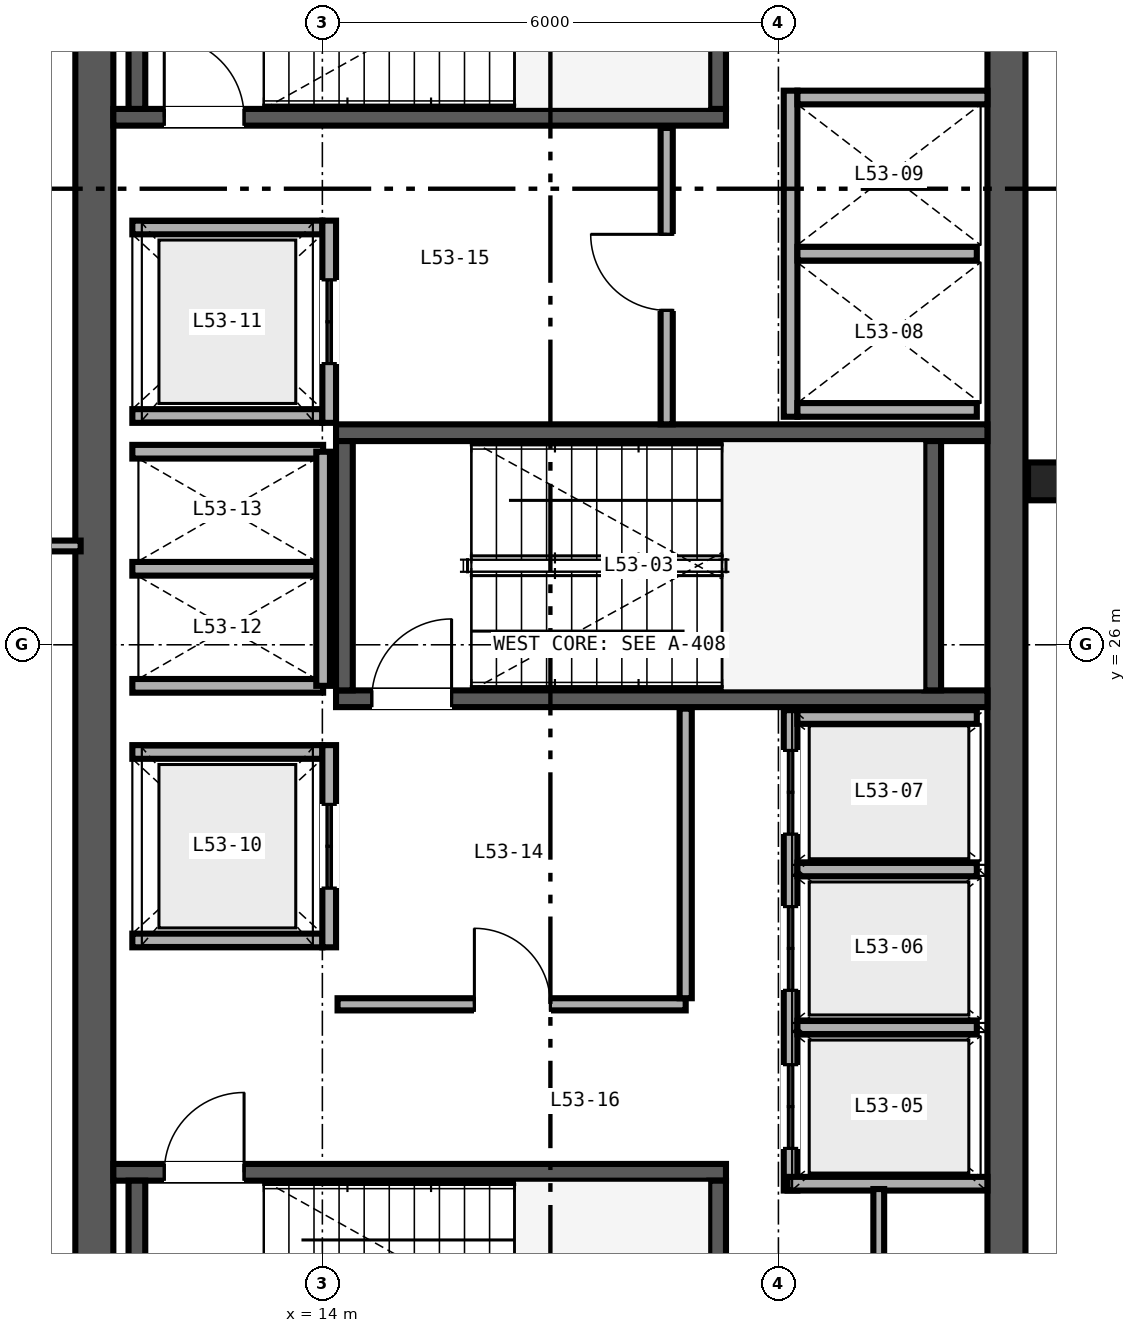
"""IFC4 building model, lengths in metres.
Left out: names, types, materials, properties, quantities, classifications, styles, units other than length and angle.
Written with IfcOpenShell. Run it as: python <this file> out.ifc"""

import sys

from ifc_helpers import new_model, si_unit, direction, frame, frame_2d, origin, origin_2d, place, context, subcontext, project, spatial, rectangle, i_section, extrude, source, transform, mapped, element, fill, save


model = new_model("IFC4")
c1 = context("Model", 3, precision=1e-05, world=origin(), true_north=direction((0.0, 1.0)))
c2 = subcontext(c1, "Body", "Model", "MODEL_VIEW")
j1 = project(units=[si_unit("LENGTHUNIT", "METRE"), si_unit("PLANEANGLEUNIT", "RADIAN")], contexts=[c1])
p1 = place(None, origin())
s1 = spatial("IfcSite", under=j1, at=p1, CompositionType="ELEMENT")
p2 = place(p1, origin())
s2 = spatial("IfcBuilding", under=s1, at=p2, CompositionType="ELEMENT")
p3 = place(p2, frame((0.0, 0.0, 210.0)))
s3 = spatial("IfcBuildingStorey", under=s2, at=p3, CompositionType="ELEMENT", Elevation=210.0)
for number, where, z_axis, x_axis in (
    (1, (11.0, 15.25, 0.0), (0.0, 0.0, 1.0), (0.0, 1.0, 0.0)),
    (2, (23.0, 15.25, 0.0), (0.0, 0.0, 1.0), (0.0, 1.0, 0.0)),
):
    element("IfcWall", number, at=place(p3, frame(where, z_axis=z_axis, x_axis=x_axis)), inside=s3, PredefinedType="SHEAR", context=c2, shape_type="SweptSolid", body=[
        extrude(rectangle(XDim=21.5, YDim=0.5, at=frame_2d((10.75, 0.0))), origin(), (0.0, 0.0, 1.0), 3.37),
    ])
p4 = place(p3, frame((11.25, 19.06, 0.0), z_axis=(0.0, 0.0, 1.0), x_axis=(1.0, 0.0, 0.0)))
e3 = element("IfcWall", 3, at=p4, inside=s3, PredefinedType="SHEAR", context=c2, shape_type="SweptSolid", body=[
    extrude(rectangle(XDim=8.06, YDim=0.22, at=frame_2d((4.03, 0.0))), origin(), (0.0, 0.0, 1.0), 3.4),
])
p5 = place(p4, frame((0.67, 0.0, 0.0)))
e4 = element("IfcOpeningElement", 4, at=p5, cuts=e3, PredefinedType="OPENING", context=c2, shape_type="SweptSolid", body=[
    extrude(rectangle(XDim=1.05, YDim=2.15, at=frame_2d((0.525, 1.075))), frame((0.0, 0.12, 0.0), z_axis=(0.0, -1.0, 0.0), x_axis=(1.0, 0.0, 0.0)), (0.0, 0.0, 1.0), 0.24),
])
for number, where, z_axis, x_axis in (
    (5, (11.56, 15.67, 0.0), (0.0, 0.0, 1.0), (0.0, 1.0, 0.0)),
    (6, (19.2, 15.67, 0.0), (0.0, 0.0, 1.0), (0.0, 1.0, 0.0)),
):
    element("IfcWall", number, at=place(p3, frame(where, z_axis=z_axis, x_axis=x_axis)), inside=s3, PredefinedType="SHEAR", context=c2, shape_type="SweptSolid", body=[
        extrude(rectangle(XDim=3.28, YDim=0.22, at=frame_2d((1.64, 0.0))), origin(), (0.0, 0.0, 1.0), 3.4),
    ])
p6 = place(p3, frame((11.25, 32.94, 0.0), z_axis=(0.0, 0.0, 1.0), x_axis=(1.0, 0.0, 0.0)))
e7 = element("IfcWall", 7, at=p6, inside=s3, PredefinedType="SHEAR", context=c2, shape_type="SweptSolid", body=[
    extrude(rectangle(XDim=8.06, YDim=0.22, at=frame_2d((4.03, 0.0))), origin(), (0.0, 0.0, 1.0), 3.4),
])
p7 = place(p6, frame((0.67, 0.0, 0.0)))
e8 = element("IfcOpeningElement", 8, at=p7, cuts=e7, PredefinedType="OPENING", context=c2, shape_type="SweptSolid", body=[
    extrude(rectangle(XDim=1.05, YDim=2.15, at=frame_2d((0.525, 1.075))), frame((0.0, 0.12, 0.0), z_axis=(0.0, -1.0, 0.0), x_axis=(1.0, 0.0, 0.0)), (0.0, 0.0, 1.0), 0.24),
])
for number, where, z_axis, x_axis in (
    (9, (11.56, 33.05, 0.0), (0.0, 0.0, 1.0), (0.0, 1.0, 0.0)),
    (10, (19.2, 33.05, 0.0), (0.0, 0.0, 1.0), (0.0, 1.0, 0.0)),
):
    element("IfcWall", number, at=place(p3, frame(where, z_axis=z_axis, x_axis=x_axis)), inside=s3, PredefinedType="SHEAR", context=c2, shape_type="SweptSolid", body=[
        extrude(rectangle(XDim=3.28, YDim=0.22, at=frame_2d((1.64, 0.0))), origin(), (0.0, 0.0, 1.0), 3.4),
    ])
p8 = place(p3, frame((14.18, 25.29, 0.0), z_axis=(0.0, 0.0, 1.0), x_axis=(1.0, 0.0, 0.0)))
e11 = element("IfcWall", 11, at=p8, inside=s3, PredefinedType="SHEAR", context=c2, shape_type="SweptSolid", body=[
    extrude(rectangle(XDim=8.57, YDim=0.22, at=frame_2d((4.285, 0.0))), origin(), (0.0, 0.0, 1.0), 3.4),
])
p9 = place(p8, frame((0.47, 0.0, 0.0)))
e12 = element("IfcOpeningElement", 12, at=p9, cuts=e11, PredefinedType="OPENING", context=c2, shape_type="SweptSolid", body=[
    extrude(rectangle(XDim=1.05, YDim=2.15, at=frame_2d((0.525, 1.075))), frame((0.0, 0.12, 0.0), z_axis=(0.0, -1.0, 0.0), x_axis=(1.0, 0.0, 0.0)), (0.0, 0.0, 1.0), 0.24),
])
p10 = place(p3, frame((14.18, 28.79, 0.0), z_axis=(0.0, 0.0, 1.0), x_axis=(1.0, 0.0, 0.0)))
e13 = element("IfcWall", 13, at=p10, inside=s3, PredefinedType="SHEAR", context=c2, shape_type="SweptSolid", body=[
    extrude(rectangle(XDim=8.57, YDim=0.22, at=frame_2d((4.285, 0.0))), origin(), (0.0, 0.0, 1.0), 3.4),
])
for number, where, z_axis, x_axis in (
    (14, (14.29, 25.4, 0.0), (0.0, 0.0, 1.0), (0.0, 1.0, 0.0)),
    (15, (22.03, 25.4, 0.0), (0.0, 0.0, 1.0), (0.0, 1.0, 0.0)),
):
    element("IfcWall", number, at=place(p3, frame(where, z_axis=z_axis, x_axis=x_axis)), inside=s3, PredefinedType="SHEAR", context=c2, shape_type="SweptSolid", body=[
        extrude(rectangle(XDim=3.28, YDim=0.22, at=frame_2d((1.64, 0.0))), origin(), (0.0, 0.0, 1.0), 3.4),
    ])
m1 = source(origin(), c2, "Body", "SweptSolid", [
    extrude(i_section(OverallWidth=0.432, OverallDepth=0.498, WebThickness=0.056, FlangeThickness=0.089, FilletRadius=0.025, at=origin_2d()), origin(), (0.0, 0.0, 1.0), 3.37),
])
p11 = place(p3, frame((23.5, 28.15, 0.0), z_axis=(0.0, 0.0, 1.0), x_axis=(1.0, 0.0, 0.0)))
e16 = element("IfcColumn", 16, at=p11, inside=s3, PredefinedType="COLUMN", context=c2, shape_type="MappedRepresentation", body=[
    mapped(m1, transform((0.0, 0.0, 0.0), scale=1.0)),
])
p12 = place(p3, frame((20.16, 18.82, 0.0), z_axis=(0.0, 0.0, 1.0), x_axis=(0.0, 1.0, 0.0)))
e17 = element("IfcWall", 17, at=p12, inside=s3, PredefinedType="SOLIDWALL", context=c2, shape_type="SweptSolid", body=[
    extrude(rectangle(XDim=6.32, YDim=0.18, at=frame_2d((3.16, 0.0))), origin(), (0.0, 0.0, 1.0), 2.47),
])
p13 = place(p12, frame((0.555, 0.0, 0.0)))
e18 = element("IfcOpeningElement", 18, at=p13, cuts=e17, PredefinedType="OPENING", context=c2, shape_type="SweptSolid", body=[
    extrude(rectangle(XDim=1.1, YDim=2.2, at=frame_2d((0.55, 1.1))), frame((0.0, 0.1, 0.0), z_axis=(0.0, -1.0, 0.0), x_axis=(1.0, 0.0, 0.0)), (0.0, 0.0, 1.0), 0.2),
])
p14 = place(p12, frame((2.635, 0.0, 0.0)))
e19 = element("IfcOpeningElement", 19, at=p14, cuts=e17, PredefinedType="OPENING", context=c2, shape_type="SweptSolid", body=[
    extrude(rectangle(XDim=1.1, YDim=2.2, at=frame_2d((0.55, 1.1))), frame((0.0, 0.1, 0.0), z_axis=(0.0, -1.0, 0.0), x_axis=(1.0, 0.0, 0.0)), (0.0, 0.0, 1.0), 0.2),
])
p15 = place(p12, frame((4.69, 0.0, 0.0)))
e20 = element("IfcOpeningElement", 20, at=p15, cuts=e17, PredefinedType="OPENING", context=c2, shape_type="SweptSolid", body=[
    extrude(rectangle(XDim=1.1, YDim=2.2, at=frame_2d((0.55, 1.1))), frame((0.0, 0.1, 0.0), z_axis=(0.0, -1.0, 0.0), x_axis=(1.0, 0.0, 0.0)), (0.0, 0.0, 1.0), 0.2),
])
p16 = place(p3, frame((20.12, 18.91, 0.0), z_axis=(0.0, 0.0, 1.0), x_axis=(1.0, 0.0, 0.0)))
e21 = element("IfcWall", 21, at=p16, inside=s3, PredefinedType="SOLIDWALL", context=c2, shape_type="SweptSolid", body=[
    extrude(rectangle(XDim=2.63, YDim=0.18, at=frame_2d((1.315, 0.0))), origin(), (0.0, 0.0, 1.0), 3.37),
])
p17 = place(p3, frame((20.25, 25.05, 0.0), z_axis=(0.0, 0.0, 1.0), x_axis=(1.0, 0.0, 0.0)))
e22 = element("IfcWall", 22, at=p17, inside=s3, PredefinedType="SOLIDWALL", context=c2, shape_type="SweptSolid", body=[
    extrude(rectangle(XDim=2.36, YDim=0.18, at=frame_2d((1.18, 0.0))), origin(), (0.0, 0.0, 1.0), 3.37),
])
p18 = place(p3, frame((20.25, 20.965, 0.0), z_axis=(0.0, 0.0, 1.0), x_axis=(1.0, 0.0, 0.0)))
e23 = element("IfcWall", 23, at=p18, inside=s3, PredefinedType="SOLIDWALL", context=c2, shape_type="SweptSolid", body=[
    extrude(rectangle(XDim=2.36, YDim=0.18, at=frame_2d((1.18, 0.0))), origin(), (0.0, 0.0, 1.0), 2.47),
])
p19 = place(p3, frame((20.25, 23.045, 0.0), z_axis=(0.0, 0.0, 1.0), x_axis=(1.0, 0.0, 0.0)))
e24 = element("IfcWall", 24, at=p19, inside=s3, PredefinedType="SOLIDWALL", context=c2, shape_type="SweptSolid", body=[
    extrude(rectangle(XDim=2.36, YDim=0.18, at=frame_2d((1.18, 0.0))), origin(), (0.0, 0.0, 1.0), 3.37),
])
p20 = place(p3, frame((20.16, 29.0, 0.0), z_axis=(0.0, 0.0, 1.0), x_axis=(0.0, 1.0, 0.0)))
e25 = element("IfcWall", 25, at=p20, inside=s3, PredefinedType="SOLIDWALL", context=c2, shape_type="SweptSolid", body=[
    extrude(rectangle(XDim=4.29, YDim=0.18, at=frame_2d((2.145, 0.0))), origin(), (0.0, 0.0, 1.0), 3.37),
])
p21 = place(p3, frame((20.25, 29.09, 0.0), z_axis=(0.0, 0.0, 1.0), x_axis=(1.0, 0.0, 0.0)))
e26 = element("IfcWall", 26, at=p21, inside=s3, PredefinedType="SOLIDWALL", context=c2, shape_type="SweptSolid", body=[
    extrude(rectangle(XDim=2.36, YDim=0.18, at=frame_2d((1.18, 0.0))), origin(), (0.0, 0.0, 1.0), 3.37),
])
p22 = place(p3, frame((20.25, 33.2, 0.0), z_axis=(0.0, 0.0, 1.0), x_axis=(1.0, 0.0, 0.0)))
e27 = element("IfcWall", 27, at=p22, inside=s3, PredefinedType="SOLIDWALL", context=c2, shape_type="SweptSolid", body=[
    extrude(rectangle(XDim=2.5, YDim=0.18, at=frame_2d((1.25, 0.0))), origin(), (0.0, 0.0, 1.0), 3.37),
])
p23 = place(p3, frame((20.25, 31.145, 0.0), z_axis=(0.0, 0.0, 1.0), x_axis=(1.0, 0.0, 0.0)))
e28 = element("IfcWall", 28, at=p23, inside=s3, PredefinedType="SOLIDWALL", context=c2, shape_type="SweptSolid", body=[
    extrude(rectangle(XDim=2.36, YDim=0.18, at=frame_2d((1.18, 0.0))), origin(), (0.0, 0.0, 1.0), 3.37),
])
for number, where, z_axis, x_axis in (
    (29, (11.5, 22.11, 0.0), (0.0, 0.0, 1.0), (1.0, 0.0, 0.0)),
    (30, (11.5, 24.59, 0.0), (0.0, 0.0, 1.0), (1.0, 0.0, 0.0)),
):
    element("IfcWall", number, at=place(p3, frame(where, z_axis=z_axis, x_axis=x_axis)), inside=s3, PredefinedType="SOLIDWALL", context=c2, shape_type="SweptSolid", body=[
        extrude(rectangle(XDim=2.5, YDim=0.18, at=frame_2d((1.25, 0.0))), origin(), (0.0, 0.0, 1.0), 3.37),
    ])
p24 = place(p3, frame((14.09, 22.02, 0.0), z_axis=(0.0, 0.0, 1.0), x_axis=(0.0, 1.0, 0.0)))
e31 = element("IfcWall", 31, at=p24, inside=s3, PredefinedType="SOLIDWALL", context=c2, shape_type="SweptSolid", body=[
    extrude(rectangle(XDim=2.66, YDim=0.18, at=frame_2d((1.33, 0.0))), origin(), (0.0, 0.0, 1.0), 3.37),
])
p25 = place(p24, frame((0.78, 0.0, 0.0)))
e32 = element("IfcOpeningElement", 32, at=p25, cuts=e31, PredefinedType="OPENING", context=c2, shape_type="SweptSolid", body=[
    extrude(rectangle(XDim=1.1, YDim=2.2, at=frame_2d((0.55, 1.1))), frame((0.0, 0.1, 0.0), z_axis=(0.0, -1.0, 0.0), x_axis=(1.0, 0.0, 0.0)), (0.0, 0.0, 1.0), 0.2),
])
for number, where, z_axis, x_axis in (
    (33, (11.5, 29.01, 0.0), (0.0, 0.0, 1.0), (1.0, 0.0, 0.0)),
    (34, (11.5, 31.49, 0.0), (0.0, 0.0, 1.0), (1.0, 0.0, 0.0)),
):
    element("IfcWall", number, at=place(p3, frame(where, z_axis=z_axis, x_axis=x_axis)), inside=s3, PredefinedType="SOLIDWALL", context=c2, shape_type="SweptSolid", body=[
        extrude(rectangle(XDim=2.5, YDim=0.18, at=frame_2d((1.25, 0.0))), origin(), (0.0, 0.0, 1.0), 3.37),
    ])
p26 = place(p3, frame((14.09, 28.92, 0.0), z_axis=(0.0, 0.0, 1.0), x_axis=(0.0, 1.0, 0.0)))
e35 = element("IfcWall", 35, at=p26, inside=s3, PredefinedType="SOLIDWALL", context=c2, shape_type="SweptSolid", body=[
    extrude(rectangle(XDim=2.66, YDim=0.18, at=frame_2d((1.33, 0.0))), origin(), (0.0, 0.0, 1.0), 3.37),
])
p27 = place(p26, frame((0.78, 0.0, 0.0)))
e36 = element("IfcOpeningElement", 36, at=p27, cuts=e35, PredefinedType="OPENING", context=c2, shape_type="SweptSolid", body=[
    extrude(rectangle(XDim=1.1, YDim=2.2, at=frame_2d((0.55, 1.1))), frame((0.0, 0.1, 0.0), z_axis=(0.0, -1.0, 0.0), x_axis=(1.0, 0.0, 0.0)), (0.0, 0.0, 1.0), 0.2),
])
for number, where, z_axis, x_axis in (
    (37, (11.5, 25.46, 0.0), (0.0, 0.0, 1.0), (1.0, 0.0, 0.0)),
    (38, (11.5, 27.0, 0.0), (0.0, 0.0, 1.0), (1.0, 0.0, 0.0)),
    (39, (11.5, 28.54, 0.0), (0.0, 0.0, 1.0), (1.0, 0.0, 0.0)),
):
    element("IfcWall", number, at=place(p3, frame(where, z_axis=z_axis, x_axis=x_axis)), inside=s3, PredefinedType="SOLIDWALL", context=c2, shape_type="SweptSolid", body=[
        extrude(rectangle(XDim=2.51, YDim=0.18, at=frame_2d((1.255, 0.0))), origin(), (0.0, 0.0, 1.0), 3.37),
    ])
p28 = place(p3, frame((14.01, 25.46, 0.0), z_axis=(0.0, 0.0, 1.0), x_axis=(0.0, 1.0, 0.0)))
e40 = element("IfcWall", 40, at=p28, inside=s3, PredefinedType="SOLIDWALL", context=c2, shape_type="SweptSolid", body=[
    extrude(rectangle(XDim=3.08, YDim=0.18, at=frame_2d((1.54, 0.0))), origin(), (0.0, 0.0, 1.0), 3.37),
])
p29 = place(p3, frame((14.2, 21.27, 0.0), z_axis=(0.0, 0.0, 1.0), x_axis=(1.0, 0.0, 0.0)))
e41 = element("IfcWall", 41, at=p29, inside=s3, PredefinedType="PARTITIONING", context=c2, shape_type="SweptSolid", body=[
    extrude(rectangle(XDim=4.58, YDim=0.16, at=frame_2d((2.29, 0.0))), origin(), (0.0, 0.0, 1.0), 3.37),
])
p30 = place(p29, frame((1.8, 0.0, 0.0)))
e42 = element("IfcOpeningElement", 42, at=p30, cuts=e41, PredefinedType="OPENING", context=c2, shape_type="SweptSolid", body=[
    extrude(rectangle(XDim=1.0, YDim=2.15, at=frame_2d((0.5, 1.075))), frame((0.0, 0.09, 0.0), z_axis=(0.0, -1.0, 0.0), x_axis=(1.0, 0.0, 0.0)), (0.0, 0.0, 1.0), 0.18),
])
p31 = place(p3, frame((18.78, 21.35, 0.0), z_axis=(0.0, 0.0, 1.0), x_axis=(0.0, 1.0, 0.0)))
e43 = element("IfcWall", 43, at=p31, inside=s3, PredefinedType="PARTITIONING", context=c2, shape_type="SweptSolid", body=[
    extrude(rectangle(XDim=3.81, YDim=0.16, at=frame_2d((1.905, 0.0))), origin(), (0.0, 0.0, 1.0), 3.37),
])
p32 = place(p3, frame((18.53, 28.9, 0.0), z_axis=(0.0, 0.0, 1.0), x_axis=(0.0, 1.0, 0.0)))
e44 = element("IfcWall", 44, at=p32, inside=s3, PredefinedType="PARTITIONING", context=c2, shape_type="SweptSolid", body=[
    extrude(rectangle(XDim=3.9, YDim=0.16, at=frame_2d((1.95, 0.0))), origin(), (0.0, 0.0, 1.0), 3.37),
])
p33 = place(p32, frame((1.5, 0.0, 0.0)))
e45 = element("IfcOpeningElement", 45, at=p33, cuts=e44, PredefinedType="OPENING", context=c2, shape_type="SweptSolid", body=[
    extrude(rectangle(XDim=1.0, YDim=2.15, at=frame_2d((0.5, 1.075))), frame((0.0, 0.09, 0.0), z_axis=(0.0, -1.0, 0.0), x_axis=(1.0, 0.0, 0.0)), (0.0, 0.0, 1.0), 0.18),
])
p34 = place(p3, frame((21.32, 15.25, 0.0), z_axis=(0.0, 0.0, 1.0), x_axis=(0.0, 1.0, 0.0)))
e46 = element("IfcWall", 46, at=p34, inside=s3, PredefinedType="PARTITIONING", context=c2, shape_type="SweptSolid", body=[
    extrude(rectangle(XDim=3.59, YDim=0.142, at=frame_2d((1.795, 0.0))), origin(), (0.0, 0.0, 1.0), 3.37),
])
p35 = place(p34, frame((1.25, 0.0, 0.0)))
e47 = element("IfcOpeningElement", 47, at=p35, cuts=e46, PredefinedType="OPENING", context=c2, shape_type="SweptSolid", body=[
    extrude(rectangle(XDim=0.84, YDim=2.1, at=frame_2d((0.42, 1.05))), frame((0.0, 0.081, 0.0), z_axis=(0.0, -1.0, 0.0), x_axis=(1.0, 0.0, 0.0)), (0.0, 0.0, 1.0), 0.162),
])
p36 = place(p3, frame((8.16, 27.3, 0.0), z_axis=(0.0, 0.0, 1.0), x_axis=(1.0, 0.0, 0.0)))
e48 = element("IfcWall", 48, at=p36, inside=s3, PredefinedType="PARTITIONING", context=c2, shape_type="SweptSolid", body=[
    extrude(rectangle(XDim=2.66, YDim=0.142, at=frame_2d((1.33, 0.0))), origin(), (0.0, 0.0, 1.0), 2.591),
])
m2 = source(origin(), c2, "Body", "SweptSolid", [
    extrude(rectangle(XDim=1.05, YDim=2.15, at=frame_2d((0.525, 1.075))), frame((0.0, 0.025, 0.0), z_axis=(0.0, -1.0, 0.0), x_axis=(1.0, 0.0, 0.0)), (0.0, 0.0, 1.0), 0.05),
])
p37 = place(p5, origin())
e49 = element("IfcDoor", 49, at=p37, inside=s3, OperationType="SINGLE_SWING_RIGHT", PredefinedType="DOOR", context=c2, shape_type="MappedRepresentation", body=[
    mapped(m2, transform((0.0, 0.0, 0.0), scale=1.0)),
])
fill(e4, e49)
p38 = place(p7, origin())
e50 = element("IfcDoor", 50, at=p38, inside=s3, OperationType="SINGLE_SWING_LEFT", PredefinedType="DOOR", context=c2, shape_type="MappedRepresentation", body=[
    mapped(m2, transform((0.0, 0.0, 0.0), scale=1.0)),
])
fill(e8, e50)
p39 = place(p9, origin())
e51 = element("IfcDoor", 51, at=p39, inside=s3, OperationType="SINGLE_SWING_RIGHT", PredefinedType="DOOR", context=c2, shape_type="MappedRepresentation", body=[
    mapped(m2, transform((0.0, 0.0, 0.0), scale=1.0)),
])
fill(e12, e51)
m3 = source(origin(), c2, "Body", "SweptSolid", [
    extrude(rectangle(XDim=1.1, YDim=2.2, at=frame_2d((0.55, 1.1))), frame((0.0, 0.025, 0.0), z_axis=(0.0, -1.0, 0.0), x_axis=(1.0, 0.0, 0.0)), (0.0, 0.0, 1.0), 0.05),
])
p40 = place(p13, origin())
e52 = element("IfcDoor", 52, at=p40, inside=s3, OperationType="DOUBLE_DOOR_SLIDING", PredefinedType="DOOR", context=c2, shape_type="MappedRepresentation", body=[
    mapped(m3, transform((0.0, 0.0, 0.0), scale=1.0)),
])
fill(e18, e52)
p41 = place(p14, origin())
e53 = element("IfcDoor", 53, at=p41, inside=s3, OperationType="DOUBLE_DOOR_SLIDING", PredefinedType="DOOR", context=c2, shape_type="MappedRepresentation", body=[
    mapped(m3, transform((0.0, 0.0, 0.0), scale=1.0)),
])
fill(e19, e53)
p42 = place(p15, origin())
e54 = element("IfcDoor", 54, at=p42, inside=s3, OperationType="DOUBLE_DOOR_SLIDING", PredefinedType="DOOR", context=c2, shape_type="MappedRepresentation", body=[
    mapped(m3, transform((0.0, 0.0, 0.0), scale=1.0)),
])
fill(e20, e54)
p43 = place(p25, origin())
e55 = element("IfcDoor", 55, at=p43, inside=s3, OperationType="DOUBLE_DOOR_SLIDING", PredefinedType="DOOR", context=c2, shape_type="MappedRepresentation", body=[
    mapped(m3, transform((0.0, 0.0, 0.0), scale=1.0)),
])
fill(e32, e55)
p44 = place(p27, origin())
e56 = element("IfcDoor", 56, at=p44, inside=s3, OperationType="DOUBLE_DOOR_SLIDING", PredefinedType="DOOR", context=c2, shape_type="MappedRepresentation", body=[
    mapped(m3, transform((0.0, 0.0, 0.0), scale=1.0)),
])
fill(e36, e56)
m4 = source(origin(), c2, "Body", "SweptSolid", [
    extrude(rectangle(XDim=1.0, YDim=2.15, at=frame_2d((0.5, 1.075))), frame((0.0, 0.025, 0.0), z_axis=(0.0, -1.0, 0.0), x_axis=(1.0, 0.0, 0.0)), (0.0, 0.0, 1.0), 0.05),
])
p45 = place(p30, origin())
e57 = element("IfcDoor", 57, at=p45, inside=s3, OperationType="SINGLE_SWING_LEFT", PredefinedType="DOOR", context=c2, shape_type="MappedRepresentation", body=[
    mapped(m4, transform((0.0, 0.0, 0.0), scale=1.0)),
])
fill(e42, e57)
p46 = place(p33, origin())
e58 = element("IfcDoor", 58, at=p46, inside=s3, OperationType="SINGLE_SWING_RIGHT", PredefinedType="DOOR", context=c2, shape_type="MappedRepresentation", body=[
    mapped(m4, transform((0.0, 0.0, 0.0), scale=1.0)),
])
fill(e45, e58)
save(model, sys.argv[1])
